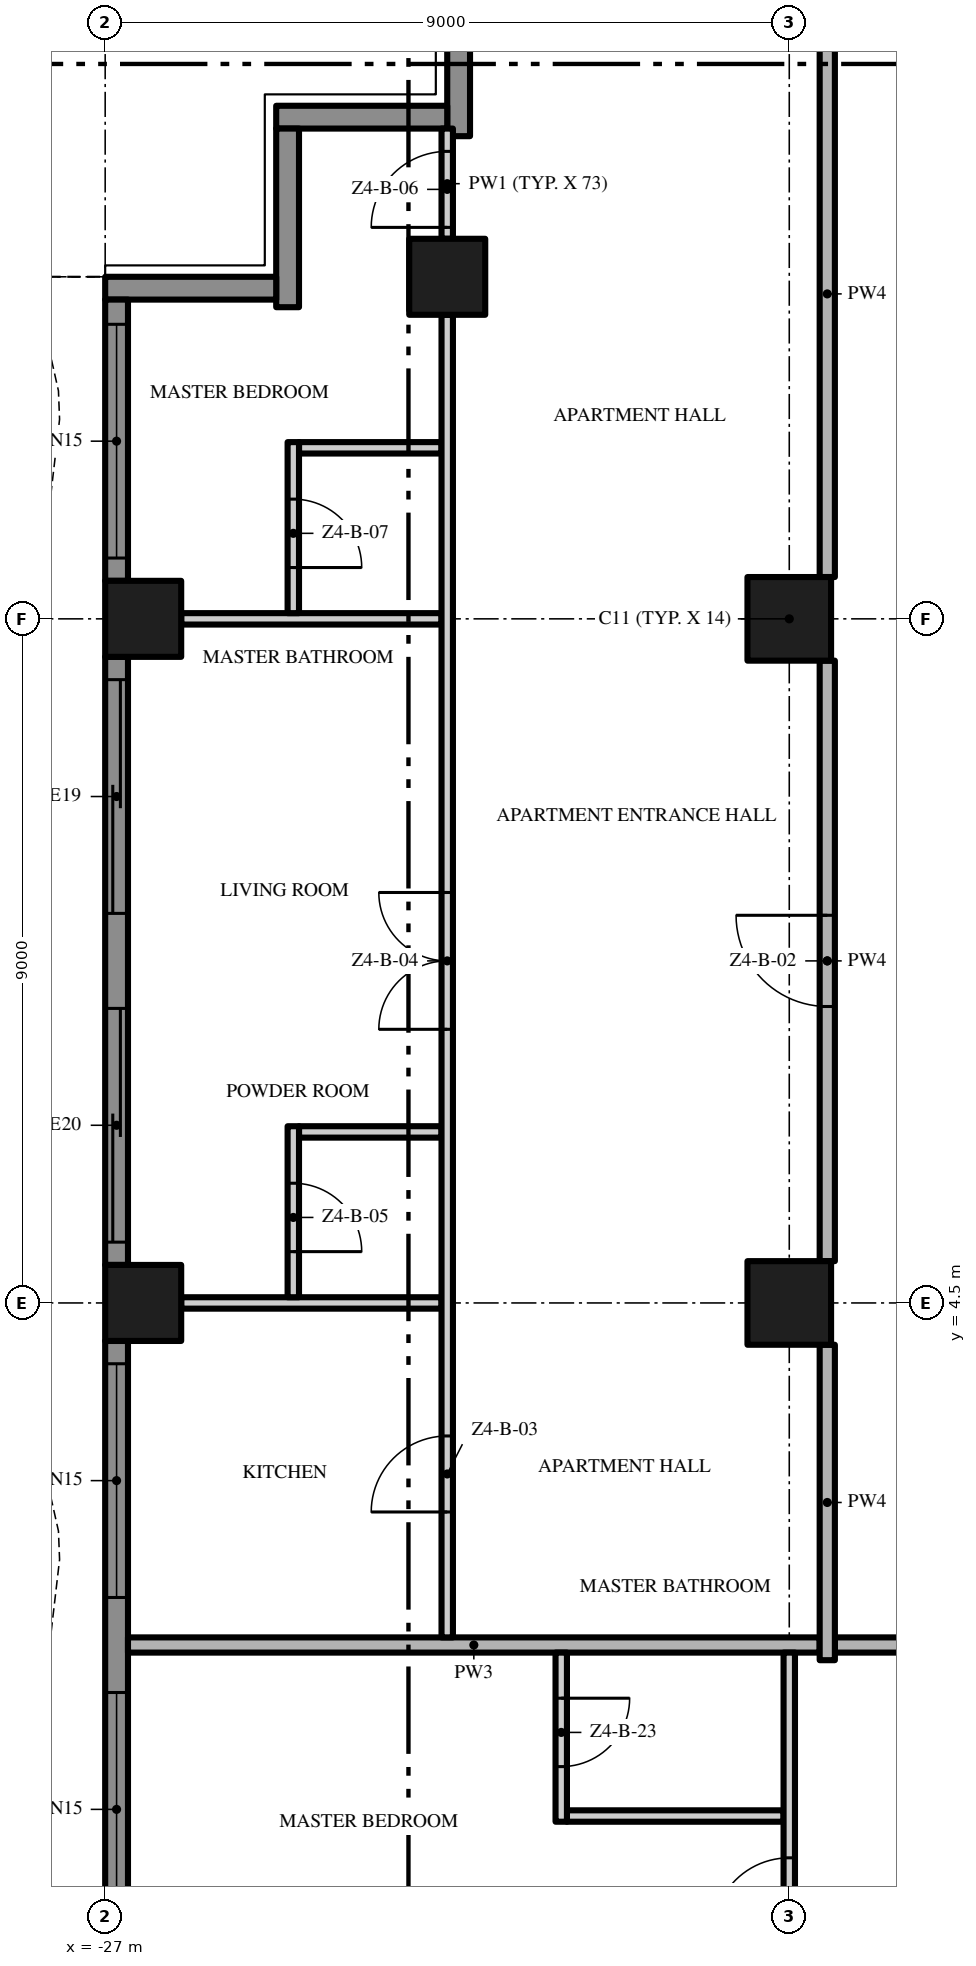
"""IFC4 building model, lengths in metres.
Left out: names, types, materials, properties, quantities, classifications, styles, units other than length and angle.
Written with IfcOpenShell. Run it as: python <this file> out.ifc"""

import sys

from ifc_helpers import new_model, si_unit, direction, frame, frame_2d, origin, origin_2d, place, context, subcontext, project, spatial, polyline, rectangle, outline, extrude, element, fill, save


model = new_model("IFC4")
c1 = context("Model", 3, precision=1e-05, world=origin(), true_north=direction((0.0, 1.0)))
c2 = subcontext(c1, "Body", "Model", "MODEL_VIEW")
j1 = project(units=[si_unit("LENGTHUNIT", "METRE"), si_unit("PLANEANGLEUNIT", "RADIAN")], contexts=[c1])
p1 = place(None, origin())
s1 = spatial("IfcSite", under=j1, at=p1, CompositionType="ELEMENT")
p2 = place(p1, origin())
s2 = spatial("IfcBuilding", under=s1, at=p2, CompositionType="ELEMENT")
p3 = place(p2, frame((0.0, 0.0, 199.6)))
s3 = spatial("IfcBuildingStorey", under=s2, at=p3, CompositionType="ELEMENT", Elevation=199.6)
for number, where, z_axis, x_axis in (
    (1, (-18.0, 13.5, 0.0), (0.0, 0.0, 1.0), (1.0, 0.0, 0.0)),
    (2, (-18.0, 4.5, 0.0), (0.0, 0.0, 1.0), (1.0, 0.0, 0.0)),
):
    element("IfcColumn", number, at=place(p3, frame(where, z_axis=z_axis, x_axis=x_axis)), inside=s3, PredefinedType="COLUMN", context=c2, shape_type="SweptSolid", body=[
        extrude(rectangle(XDim=1.1, YDim=1.1, at=origin_2d()), origin(), (0.0, 0.0, 1.0), 3.5),
    ])
for number, where, z_axis, x_axis in (
    (3, (-26.5, 13.5, 0.0), (0.0, 0.0, 1.0), (1.0, 0.0, 0.0)),
    (4, (-22.5, 18.0, 0.0), (0.0, 0.0, 1.0), (1.0, 0.0, 0.0)),
    (5, (-26.5, 4.5, 0.0), (0.0, 0.0, 1.0), (1.0, 0.0, 0.0)),
):
    element("IfcColumn", number, at=place(p3, frame(where, z_axis=z_axis, x_axis=x_axis)), inside=s3, PredefinedType="COLUMN", context=c2, shape_type="SweptSolid", body=[
        extrude(rectangle(XDim=1.0, YDim=1.0, at=origin_2d()), origin(), (0.0, 0.0, 1.0), 3.5),
    ])
p4 = place(p3, frame((-22.35, 19.85, 0.0), z_axis=(0.0, 0.0, 1.0), x_axis=(0.0, 1.0, 0.0)))
e6 = element("IfcWall", 6, at=p4, inside=s3, PredefinedType="SOLIDWALL", context=c2, shape_type="SweptSolid", body=[
    extrude(rectangle(XDim=2.35, YDim=0.3, at=frame_2d((1.175, 0.0))), origin(), (0.0, 0.0, 1.0), 3.5),
])
p5 = place(p3, frame((-24.75, 20.1, 0.0), z_axis=(0.0, 0.0, 1.0), x_axis=(1.0, 0.0, 0.0)))
e7 = element("IfcWall", 7, at=p5, inside=s3, PredefinedType="SOLIDWALL", context=c2, shape_type="SweptSolid", body=[
    extrude(rectangle(XDim=2.25, YDim=0.3, at=frame_2d((1.125, 0.0))), origin(), (0.0, 0.0, 1.0), 3.5),
])
p6 = place(p3, frame((-24.6, 17.6, 0.0), z_axis=(0.0, 0.0, 1.0), x_axis=(0.0, 1.0, 0.0)))
e8 = element("IfcWall", 8, at=p6, inside=s3, PredefinedType="SOLIDWALL", context=c2, shape_type="SweptSolid", body=[
    extrude(rectangle(XDim=2.35, YDim=0.3, at=frame_2d((1.175, 0.0))), origin(), (0.0, 0.0, 1.0), 3.5),
])
p7 = place(p3, frame((-27.0, 17.85, 0.0), z_axis=(0.0, 0.0, 1.0), x_axis=(1.0, 0.0, 0.0)))
e9 = element("IfcWall", 9, at=p7, inside=s3, PredefinedType="SOLIDWALL", context=c2, shape_type="SweptSolid", body=[
    extrude(rectangle(XDim=2.25, YDim=0.3, at=frame_2d((1.125, 0.0))), origin(), (0.0, 0.0, 1.0), 3.5),
])
p8 = place(p3, frame((-26.85, 14.0, 0.0), z_axis=(0.0, 0.0, 1.0), x_axis=(0.0, 1.0, 0.0)))
e10 = element("IfcWall", 10, at=p8, inside=s3, PredefinedType="SOLIDWALL", context=c2, shape_type="SweptSolid", body=[
    extrude(rectangle(XDim=3.7, YDim=0.3, at=frame_2d((1.85, 0.0))), origin(), (0.0, 0.0, 1.0), 3.5),
])
p9 = place(p8, frame((0.3, 0.0, 0.45)))
e11 = element("IfcOpeningElement", 11, at=p9, cuts=e10, PredefinedType="OPENING", context=c2, shape_type="SweptSolid", body=[
    extrude(rectangle(XDim=3.075, YDim=2.65, at=frame_2d((1.538, 1.325))), frame((0.0, 0.16, 0.0), z_axis=(0.0, -1.0, 0.0), x_axis=(1.0, 0.0, 0.0)), (0.0, 0.0, 1.0), 0.32),
])
p10 = place(p3, frame((-26.85, 5.0, 0.0), z_axis=(0.0, 0.0, 1.0), x_axis=(0.0, 1.0, 0.0)))
e12 = element("IfcWall", 12, at=p10, inside=s3, PredefinedType="SOLIDWALL", context=c2, shape_type="SweptSolid", body=[
    extrude(rectangle(XDim=8.0, YDim=0.3, at=frame_2d((4.0, 0.0))), origin(), (0.0, 0.0, 1.0), 3.5),
])
p11 = place(p10, frame((4.625, 0.0, 0.0)))
e13 = element("IfcOpeningElement", 13, at=p11, cuts=e12, PredefinedType="OPENING", context=c2, shape_type="SweptSolid", body=[
    extrude(rectangle(XDim=3.075, YDim=2.4, at=frame_2d((1.538, 1.2))), frame((0.0, 0.16, 0.0), z_axis=(0.0, -1.0, 0.0), x_axis=(1.0, 0.0, 0.0)), (0.0, 0.0, 1.0), 0.32),
])
p12 = place(p10, frame((0.3, 0.0, 0.0)))
e14 = element("IfcOpeningElement", 14, at=p12, cuts=e12, PredefinedType="OPENING", context=c2, shape_type="SweptSolid", body=[
    extrude(rectangle(XDim=3.075, YDim=2.4, at=frame_2d((1.538, 1.2))), frame((0.0, 0.16, 0.0), z_axis=(0.0, -1.0, 0.0), x_axis=(1.0, 0.0, 0.0)), (0.0, 0.0, 1.0), 0.32),
])
p13 = place(p3, frame((-26.85, -4.0, 0.0), z_axis=(0.0, 0.0, 1.0), x_axis=(0.0, 1.0, 0.0)))
e15 = element("IfcWall", 15, at=p13, inside=s3, PredefinedType="SOLIDWALL", context=c2, shape_type="SweptSolid", body=[
    extrude(rectangle(XDim=8.0, YDim=0.3, at=frame_2d((4.0, 0.0))), origin(), (0.0, 0.0, 1.0), 3.5),
])
p14 = place(p13, frame((4.625, 0.0, 0.45)))
e16 = element("IfcOpeningElement", 16, at=p14, cuts=e15, PredefinedType="OPENING", context=c2, shape_type="SweptSolid", body=[
    extrude(rectangle(XDim=3.075, YDim=2.65, at=frame_2d((1.538, 1.325))), frame((0.0, 0.16, 0.0), z_axis=(0.0, -1.0, 0.0), x_axis=(1.0, 0.0, 0.0)), (0.0, 0.0, 1.0), 0.32),
])
p15 = place(p13, frame((0.3, 0.0, 0.45)))
e17 = element("IfcOpeningElement", 17, at=p15, cuts=e15, PredefinedType="OPENING", context=c2, shape_type="SweptSolid", body=[
    extrude(rectangle(XDim=3.075, YDim=2.65, at=frame_2d((1.538, 1.325))), frame((0.0, 0.16, 0.0), z_axis=(0.0, -1.0, 0.0), x_axis=(1.0, 0.0, 0.0)), (0.0, 0.0, 1.0), 0.32),
])
p16 = place(p3, origin())
e18 = element("IfcWall", 18, at=p16, inside=s3, PredefinedType="USERDEFINED", context=c2, shape_type="SweptSolid", body=[
    extrude(outline(polyline([(-27.951, 18.0), (-27.615, 16.5), (-27.6, 16.125), (-27.731, 15.0), (-28.255, 13.5), (-28.988, 12.0), (-29.649, 10.5), (-29.985, 9.0), (-30.0, 8.625), (-29.869, 7.5), (-29.345, 6.0), (-28.612, 4.5), (-27.951, 3.0), (-27.615, 1.5), (-27.6, 1.125), (-27.731, 0.0), (-28.255, -1.5), (-28.988, -3.0), (-29.649, -4.5), (-29.985, -6.0), (-30.0, -6.375), (-29.869, -7.5), (-29.345, -9.0), (-28.612, -10.5), (-27.951, -12.0), (-27.615, -13.5), (-27.6, -13.875), (-27.731, -15.0), (-28.255, -16.5), (-28.988, -18.0), (-28.763, -18.11), (-28.024, -16.596), (-27.486, -15.056), (-27.349, -13.885), (-27.366, -13.467), (-27.713, -11.921), (-28.385, -10.395), (-29.114, -8.904), (-29.624, -7.444), (-29.749, -6.365), (-29.736, -6.033), (-29.41, -4.579), (-28.761, -3.105), (-28.024, -1.596), (-27.486, -0.056), (-27.349, 1.115), (-27.366, 1.533), (-27.713, 3.079), (-28.385, 4.605), (-29.114, 6.096), (-29.624, 7.556), (-29.749, 8.635), (-29.736, 8.967), (-29.41, 10.421), (-28.761, 11.895), (-28.024, 13.404), (-27.486, 14.944), (-27.349, 16.115), (-27.366, 16.533), (-27.708, 18.055), (-27.951, 18.0)])), origin(), (0.0, 0.0, 1.0), 0.9),
])
p17 = place(p3, frame((-20.925, -2.25, 0.0), z_axis=(0.0, 0.0, 1.0), x_axis=(1.0, 0.0, 0.0)))
e19 = element("IfcWall", 19, at=p17, inside=s3, PredefinedType="PARTITIONING", context=c2, shape_type="SweptSolid", body=[
    extrude(rectangle(XDim=2.85, YDim=0.15, at=frame_2d((1.425, 0.0))), origin(), (0.0, 0.0, 1.0), 3.5),
])
p18 = place(p3, frame((-17.4, 0.0, 0.0), z_axis=(0.0, 0.0, 1.0), x_axis=(1.0, 0.0, 0.0)))
e20 = element("IfcWall", 20, at=p18, inside=s3, PredefinedType="PARTITIONING", context=c2, shape_type="SweptSolid", body=[
    extrude(rectangle(XDim=12.8, YDim=0.2, at=frame_2d((6.4, 0.0))), origin(), (0.0, 0.0, 1.0), 3.5),
])
p19 = place(p3, frame((-26.7, 0.0, 0.0), z_axis=(0.0, 0.0, 1.0), x_axis=(1.0, 0.0, 0.0)))
e21 = element("IfcWall", 21, at=p19, inside=s3, PredefinedType="PARTITIONING", context=c2, shape_type="SweptSolid", body=[
    extrude(rectangle(XDim=9.1, YDim=0.2, at=frame_2d((4.55, 0.0))), origin(), (0.0, 0.0, 1.0), 3.5),
])
p20 = place(p3, frame((-26.0, 4.5, 0.0), z_axis=(0.0, 0.0, 1.0), x_axis=(1.0, 0.0, 0.0)))
e22 = element("IfcWall", 22, at=p20, inside=s3, PredefinedType="PARTITIONING", context=c2, shape_type="SweptSolid", body=[
    extrude(rectangle(XDim=3.425, YDim=0.15, at=frame_2d((1.712, 0.0))), origin(), (0.0, 0.0, 1.0), 3.5),
])
p21 = place(p3, frame((-24.45, 6.75, 0.0), z_axis=(0.0, 0.0, 1.0), x_axis=(1.0, 0.0, 0.0)))
e23 = element("IfcWall", 23, at=p21, inside=s3, PredefinedType="PARTITIONING", context=c2, shape_type="SweptSolid", body=[
    extrude(rectangle(XDim=1.875, YDim=0.15, at=frame_2d((0.938, 0.0))), origin(), (0.0, 0.0, 1.0), 3.5),
])
p22 = place(p3, frame((-26.0, 13.5, 0.0), z_axis=(0.0, 0.0, 1.0), x_axis=(1.0, 0.0, 0.0)))
e24 = element("IfcWall", 24, at=p22, inside=s3, PredefinedType="PARTITIONING", context=c2, shape_type="SweptSolid", body=[
    extrude(rectangle(XDim=3.425, YDim=0.15, at=frame_2d((1.712, 0.0))), origin(), (0.0, 0.0, 1.0), 3.5),
])
p23 = place(p3, frame((-24.45, 15.75, 0.0), z_axis=(0.0, 0.0, 1.0), x_axis=(1.0, 0.0, 0.0)))
e25 = element("IfcWall", 25, at=p23, inside=s3, PredefinedType="PARTITIONING", context=c2, shape_type="SweptSolid", body=[
    extrude(rectangle(XDim=1.875, YDim=0.15, at=frame_2d((0.938, 0.0))), origin(), (0.0, 0.0, 1.0), 3.5),
])
p24 = place(p3, frame((-24.525, 6.825, 0.0), z_axis=(0.0, 0.0, 1.0), x_axis=(0.0, -1.0, 0.0)))
e26 = element("IfcWall", 26, at=p24, inside=s3, PredefinedType="PARTITIONING", context=c2, shape_type="SweptSolid", body=[
    extrude(rectangle(XDim=2.25, YDim=0.15, at=frame_2d((1.125, 0.0))), origin(), (0.0, 0.0, 1.0), 3.5),
])
p25 = place(p24, frame((0.75, 0.0, 0.0)))
e27 = element("IfcOpeningElement", 27, at=p25, cuts=e26, PredefinedType="OPENING", context=c2, shape_type="SweptSolid", body=[
    extrude(rectangle(XDim=0.9, YDim=2.1, at=frame_2d((0.45, 1.05))), frame((0.0, 0.085, 0.0), z_axis=(0.0, -1.0, 0.0), x_axis=(1.0, 0.0, 0.0)), (0.0, 0.0, 1.0), 0.17),
])
p26 = place(p3, frame((-24.525, 15.825, 0.0), z_axis=(0.0, 0.0, 1.0), x_axis=(0.0, -1.0, 0.0)))
e28 = element("IfcWall", 28, at=p26, inside=s3, PredefinedType="PARTITIONING", context=c2, shape_type="SweptSolid", body=[
    extrude(rectangle(XDim=2.25, YDim=0.15, at=frame_2d((1.125, 0.0))), origin(), (0.0, 0.0, 1.0), 3.5),
])
p27 = place(p26, frame((0.75, 0.0, 0.0)))
e29 = element("IfcOpeningElement", 29, at=p27, cuts=e28, PredefinedType="OPENING", context=c2, shape_type="SweptSolid", body=[
    extrude(rectangle(XDim=0.9, YDim=2.1, at=frame_2d((0.45, 1.05))), frame((0.0, 0.085, 0.0), z_axis=(0.0, -1.0, 0.0), x_axis=(1.0, 0.0, 0.0)), (0.0, 0.0, 1.0), 0.17),
])
p28 = place(p3, frame((-22.5, 0.1, 0.0), z_axis=(0.0, 0.0, 1.0), x_axis=(0.0, 1.0, 0.0)))
e30 = element("IfcWall", 30, at=p28, inside=s3, PredefinedType="PARTITIONING", context=c2, shape_type="SweptSolid", body=[
    extrude(rectangle(XDim=17.4, YDim=0.15, at=frame_2d((8.7, 0.0))), origin(), (0.0, 0.0, 1.0), 3.5),
])
p29 = place(p28, frame((1.65, 0.0, 0.0)))
e31 = element("IfcOpeningElement", 31, at=p29, cuts=e30, PredefinedType="OPENING", context=c2, shape_type="SweptSolid", body=[
    extrude(rectangle(XDim=1.0, YDim=2.4, at=frame_2d((0.5, 1.2))), frame((0.0, 0.085, 0.0), z_axis=(0.0, -1.0, 0.0), x_axis=(1.0, 0.0, 0.0)), (0.0, 0.0, 1.0), 0.17),
])
p30 = place(p28, frame((8.0, 0.0, 0.0)))
e32 = element("IfcOpeningElement", 32, at=p30, cuts=e30, PredefinedType="OPENING", context=c2, shape_type="SweptSolid", body=[
    extrude(rectangle(XDim=1.8, YDim=2.4, at=frame_2d((0.9, 1.2))), frame((0.0, 0.085, 0.0), z_axis=(0.0, -1.0, 0.0), x_axis=(1.0, 0.0, 0.0)), (0.0, 0.0, 1.0), 0.17),
])
p31 = place(p3, frame((-22.5, 18.5, 0.0), z_axis=(0.0, 0.0, 1.0), x_axis=(0.0, 1.0, 0.0)))
e33 = element("IfcWall", 33, at=p31, inside=s3, PredefinedType="PARTITIONING", context=c2, shape_type="SweptSolid", body=[
    extrude(rectangle(XDim=1.45, YDim=0.15, at=frame_2d((0.725, 0.0))), origin(), (0.0, 0.0, 1.0), 3.5),
])
p32 = place(p31, frame((0.15, 0.0, 0.0)))
e34 = element("IfcOpeningElement", 34, at=p32, cuts=e33, PredefinedType="OPENING", context=c2, shape_type="SweptSolid", body=[
    extrude(rectangle(XDim=1.0, YDim=2.4, at=frame_2d((0.5, 1.2))), frame((0.0, 0.085, 0.0), z_axis=(0.0, -1.0, 0.0), x_axis=(1.0, 0.0, 0.0)), (0.0, 0.0, 1.0), 0.17),
])
p33 = place(p3, frame((-21.0, -0.1, 0.0), z_axis=(0.0, 0.0, 1.0), x_axis=(0.0, -1.0, 0.0)))
e35 = element("IfcWall", 35, at=p33, inside=s3, PredefinedType="PARTITIONING", context=c2, shape_type="SweptSolid", body=[
    extrude(rectangle(XDim=2.225, YDim=0.15, at=frame_2d((1.113, 0.0))), origin(), (0.0, 0.0, 1.0), 3.5),
])
p34 = place(p33, frame((0.6, 0.0, 0.0)))
e36 = element("IfcOpeningElement", 36, at=p34, cuts=e35, PredefinedType="OPENING", context=c2, shape_type="SweptSolid", body=[
    extrude(rectangle(XDim=0.9, YDim=2.1, at=frame_2d((0.45, 1.05))), frame((0.0, 0.085, 0.0), z_axis=(0.0, -1.0, 0.0), x_axis=(1.0, 0.0, 0.0)), (0.0, 0.0, 1.0), 0.17),
])
p35 = place(p3, frame((-18.0, -3.95, 0.0), z_axis=(0.0, 0.0, 1.0), x_axis=(0.0, 1.0, 0.0)))
e37 = element("IfcWall", 37, at=p35, inside=s3, PredefinedType="PARTITIONING", context=c2, shape_type="SweptSolid", body=[
    extrude(rectangle(XDim=3.85, YDim=0.15, at=frame_2d((1.925, 0.0))), origin(), (0.0, 0.0, 1.0), 3.5),
])
p36 = place(p35, frame((0.15, 0.0, 0.0)))
e38 = element("IfcOpeningElement", 38, at=p36, cuts=e37, PredefinedType="OPENING", context=c2, shape_type="SweptSolid", body=[
    extrude(rectangle(XDim=1.0, YDim=2.4, at=frame_2d((0.5, 1.2))), frame((0.0, 0.085, 0.0), z_axis=(0.0, -1.0, 0.0), x_axis=(1.0, 0.0, 0.0)), (0.0, 0.0, 1.0), 0.17),
])
p37 = place(p3, frame((-17.5, -0.2, 0.0), z_axis=(0.0, 0.0, 1.0), x_axis=(0.0, 1.0, 0.0)))
e39 = element("IfcWall", 39, at=p37, inside=s3, PredefinedType="PARTITIONING", context=c2, shape_type="SweptSolid", body=[
    extrude(rectangle(XDim=4.15, YDim=0.2, at=frame_2d((2.075, 0.0))), origin(), (0.0, 0.0, 1.0), 3.5),
])
p38 = place(p3, frame((-17.5, 5.05, 0.0), z_axis=(0.0, 0.0, 1.0), x_axis=(0.0, 1.0, 0.0)))
e40 = element("IfcWall", 40, at=p38, inside=s3, PredefinedType="PARTITIONING", context=c2, shape_type="SweptSolid", body=[
    extrude(rectangle(XDim=7.9, YDim=0.2, at=frame_2d((3.95, 0.0))), origin(), (0.0, 0.0, 1.0), 3.5),
])
p39 = place(p38, frame((3.35, 0.0, 0.0)))
e41 = element("IfcOpeningElement", 41, at=p39, cuts=e40, PredefinedType="OPENING", context=c2, shape_type="SweptSolid", body=[
    extrude(rectangle(XDim=1.2, YDim=2.4, at=frame_2d((0.6, 1.2))), frame((0.0, 0.11, 0.0), z_axis=(0.0, -1.0, 0.0), x_axis=(1.0, 0.0, 0.0)), (0.0, 0.0, 1.0), 0.22),
])
p40 = place(p3, frame((-17.5, 14.05, 0.0), z_axis=(0.0, 0.0, 1.0), x_axis=(0.0, 1.0, 0.0)))
e42 = element("IfcWall", 42, at=p40, inside=s3, PredefinedType="PARTITIONING", context=c2, shape_type="SweptSolid", body=[
    extrude(rectangle(XDim=7.45, YDim=0.2, at=frame_2d((3.725, 0.0))), origin(), (0.0, 0.0, 1.0), 3.5),
])
p41 = place(p9, origin())
e43 = element("IfcWindow", 43, at=p41, inside=s3, PartitioningType="SINGLE_PANEL", PredefinedType="WINDOW", context=c2, shape_type="SweptSolid", body=[
    extrude(rectangle(XDim=3.075, YDim=2.65, at=frame_2d((1.538, 1.325))), frame((0.0, 0.03, 0.0), z_axis=(0.0, -1.0, 0.0), x_axis=(1.0, 0.0, 0.0)), (0.0, 0.0, 1.0), 0.06),
])
fill(e11, e43)
p42 = place(p11, origin())
e44 = element("IfcDoor", 44, at=p42, inside=s3, OperationType="SINGLE_SWING_LEFT", PredefinedType="DOOR", context=c2, shape_type="SweptSolid", body=[
    extrude(rectangle(XDim=3.075, YDim=2.4, at=frame_2d((1.538, 1.2))), frame((0.0, 0.025, 0.0), z_axis=(0.0, -1.0, 0.0), x_axis=(1.0, 0.0, 0.0)), (0.0, 0.0, 1.0), 0.05),
])
fill(e13, e44)
p43 = place(p12, origin())
e45 = element("IfcDoor", 45, at=p43, inside=s3, OperationType="SINGLE_SWING_LEFT", PredefinedType="DOOR", context=c2, shape_type="SweptSolid", body=[
    extrude(rectangle(XDim=3.075, YDim=2.4, at=frame_2d((1.538, 1.2))), frame((0.0, 0.025, 0.0), z_axis=(0.0, -1.0, 0.0), x_axis=(1.0, 0.0, 0.0)), (0.0, 0.0, 1.0), 0.05),
])
fill(e14, e45)
p44 = place(p14, origin())
e46 = element("IfcWindow", 46, at=p44, inside=s3, PartitioningType="SINGLE_PANEL", PredefinedType="WINDOW", context=c2, shape_type="SweptSolid", body=[
    extrude(rectangle(XDim=3.075, YDim=2.65, at=frame_2d((1.538, 1.325))), frame((0.0, 0.03, 0.0), z_axis=(0.0, -1.0, 0.0), x_axis=(1.0, 0.0, 0.0)), (0.0, 0.0, 1.0), 0.06),
])
fill(e16, e46)
p45 = place(p15, origin())
e47 = element("IfcWindow", 47, at=p45, inside=s3, PartitioningType="SINGLE_PANEL", PredefinedType="WINDOW", context=c2, shape_type="SweptSolid", body=[
    extrude(rectangle(XDim=3.075, YDim=2.65, at=frame_2d((1.538, 1.325))), frame((0.0, 0.03, 0.0), z_axis=(0.0, -1.0, 0.0), x_axis=(1.0, 0.0, 0.0)), (0.0, 0.0, 1.0), 0.06),
])
fill(e17, e47)
p46 = place(p39, origin())
e48 = element("IfcDoor", 48, at=p46, inside=s3, OperationType="SINGLE_SWING_RIGHT", PredefinedType="DOOR", context=c2, shape_type="SweptSolid", body=[
    extrude(rectangle(XDim=1.2, YDim=2.4, at=frame_2d((0.6, 1.2))), frame((0.0, 0.025, 0.0), z_axis=(0.0, -1.0, 0.0), x_axis=(1.0, 0.0, 0.0)), (0.0, 0.0, 1.0), 0.05),
])
fill(e41, e48)
p47 = place(p29, origin())
e49 = element("IfcDoor", 49, at=p47, inside=s3, OperationType="SINGLE_SWING_LEFT", PredefinedType="DOOR", context=c2, shape_type="SweptSolid", body=[
    extrude(rectangle(XDim=1.0, YDim=2.4, at=frame_2d((0.5, 1.2))), frame((0.0, 0.025, 0.0), z_axis=(0.0, -1.0, 0.0), x_axis=(1.0, 0.0, 0.0)), (0.0, 0.0, 1.0), 0.05),
])
fill(e31, e49)
p48 = place(p30, origin())
e50 = element("IfcDoor", 50, at=p48, inside=s3, OperationType="DOUBLE_DOOR_SINGLE_SWING", PredefinedType="DOOR", context=c2, shape_type="SweptSolid", body=[
    extrude(rectangle(XDim=1.8, YDim=2.4, at=frame_2d((0.9, 1.2))), frame((0.0, 0.025, 0.0), z_axis=(0.0, -1.0, 0.0), x_axis=(1.0, 0.0, 0.0)), (0.0, 0.0, 1.0), 0.05),
])
fill(e32, e50)
p49 = place(p25, origin())
e51 = element("IfcDoor", 51, at=p49, inside=s3, OperationType="SINGLE_SWING_RIGHT", PredefinedType="DOOR", context=c2, shape_type="SweptSolid", body=[
    extrude(rectangle(XDim=0.9, YDim=2.1, at=frame_2d((0.45, 1.05))), frame((0.0, 0.025, 0.0), z_axis=(0.0, -1.0, 0.0), x_axis=(1.0, 0.0, 0.0)), (0.0, 0.0, 1.0), 0.05),
])
fill(e27, e51)
p50 = place(p32, origin())
e52 = element("IfcDoor", 52, at=p50, inside=s3, OperationType="SINGLE_SWING_LEFT", PredefinedType="DOOR", context=c2, shape_type="SweptSolid", body=[
    extrude(rectangle(XDim=1.0, YDim=2.4, at=frame_2d((0.5, 1.2))), frame((0.0, 0.025, 0.0), z_axis=(0.0, -1.0, 0.0), x_axis=(1.0, 0.0, 0.0)), (0.0, 0.0, 1.0), 0.05),
])
fill(e34, e52)
p51 = place(p27, origin())
e53 = element("IfcDoor", 53, at=p51, inside=s3, OperationType="SINGLE_SWING_RIGHT", PredefinedType="DOOR", context=c2, shape_type="SweptSolid", body=[
    extrude(rectangle(XDim=0.9, YDim=2.1, at=frame_2d((0.45, 1.05))), frame((0.0, 0.025, 0.0), z_axis=(0.0, -1.0, 0.0), x_axis=(1.0, 0.0, 0.0)), (0.0, 0.0, 1.0), 0.05),
])
fill(e29, e53)
p52 = place(p36, origin())
e54 = element("IfcDoor", 54, at=p52, inside=s3, OperationType="SINGLE_SWING_LEFT", PredefinedType="DOOR", context=c2, shape_type="SweptSolid", body=[
    extrude(rectangle(XDim=1.0, YDim=2.4, at=frame_2d((0.5, 1.2))), frame((0.0, 0.025, 0.0), z_axis=(0.0, -1.0, 0.0), x_axis=(1.0, 0.0, 0.0)), (0.0, 0.0, 1.0), 0.05),
])
fill(e38, e54)
p53 = place(p34, origin())
e55 = element("IfcDoor", 55, at=p53, inside=s3, OperationType="SINGLE_SWING_LEFT", PredefinedType="DOOR", context=c2, shape_type="SweptSolid", body=[
    extrude(rectangle(XDim=0.9, YDim=2.1, at=frame_2d((0.45, 1.05))), frame((0.0, 0.025, 0.0), z_axis=(0.0, -1.0, 0.0), x_axis=(1.0, 0.0, 0.0)), (0.0, 0.0, 1.0), 0.05),
])
fill(e36, e55)
save(model, sys.argv[1])
